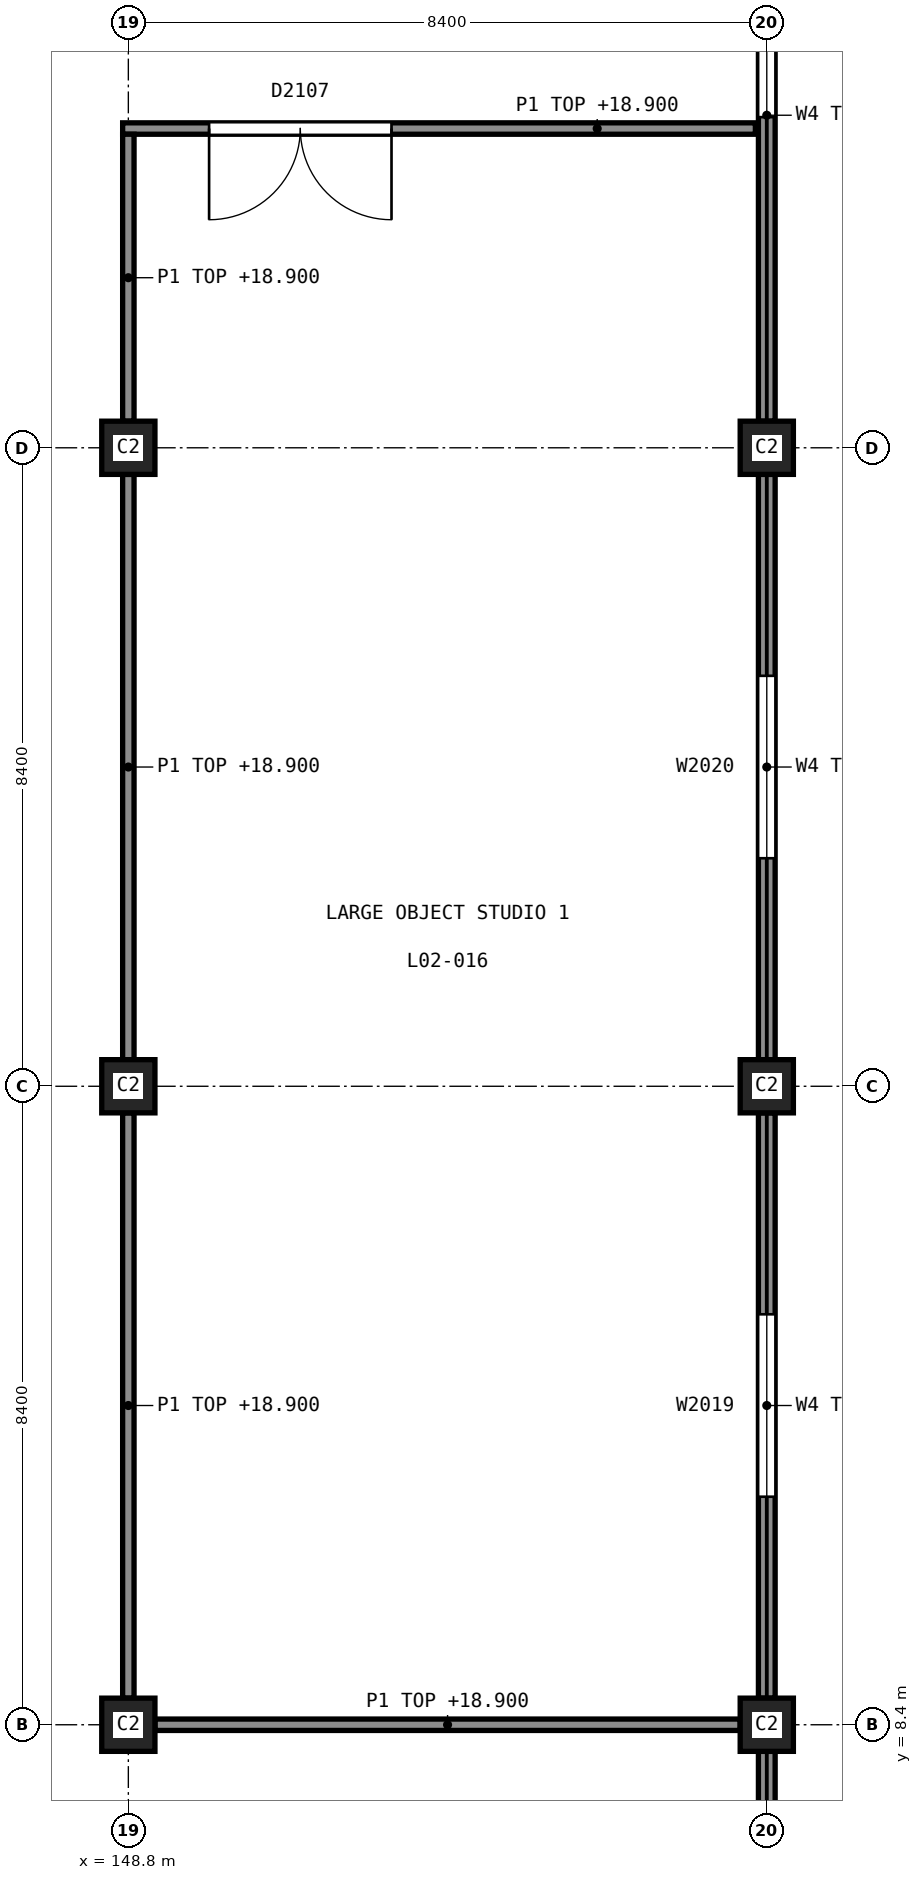
"""IFC4 building model, lengths in metres.
Left out: names, types, materials, properties, quantities, classifications, styles, units other than length and angle.
Written with IfcOpenShell. Run it as: python <this file> out.ifc"""

import sys

from ifc_helpers import new_model, si_unit, direction, frame, frame_2d, origin, origin_2d, place, context, subcontext, project, spatial, rectangle, extrude, element, fill, save


model = new_model("IFC4")
c1 = context("Model", 3, precision=1e-05, world=origin(), true_north=direction((0.0, 1.0)))
c2 = subcontext(c1, "Body", "Model", "MODEL_VIEW")
j1 = project(units=[si_unit("LENGTHUNIT", "METRE"), si_unit("PLANEANGLEUNIT", "RADIAN")], contexts=[c1])
p1 = place(None, origin())
s1 = spatial("IfcSite", under=j1, at=p1, CompositionType="ELEMENT")
p2 = place(p1, origin())
s2 = spatial("IfcBuilding", under=s1, at=p2, CompositionType="ELEMENT")
p3 = place(p2, frame((0.0, 0.0, 10.5)))
s3 = spatial("IfcBuildingStorey", under=s2, at=p3, CompositionType="ELEMENT", Elevation=10.5)
for number, where, z_axis, x_axis in (
    (1, (148.8, 8.4, 0.0), (0.0, 0.0, 1.0), (1.0, 0.0, 0.0)),
    (2, (148.8, 16.8, 0.0), (0.0, 0.0, 1.0), (1.0, 0.0, 0.0)),
    (3, (148.8, 25.2, 0.0), (0.0, 0.0, 1.0), (1.0, 0.0, 0.0)),
    (4, (157.2, 8.4, 0.0), (0.0, 0.0, 1.0), (1.0, 0.0, 0.0)),
    (5, (157.2, 16.8, 0.0), (0.0, 0.0, 1.0), (1.0, 0.0, 0.0)),
    (6, (157.2, 25.2, 0.0), (0.0, 0.0, 1.0), (1.0, 0.0, 0.0)),
):
    element("IfcColumn", number, at=place(p3, frame(where, z_axis=z_axis, x_axis=x_axis)), inside=s3, PredefinedType="COLUMN", context=c2, shape_type="SweptSolid", body=[
        extrude(rectangle(XDim=0.7, YDim=0.7, at=origin_2d()), origin(), (0.0, 0.0, 1.0), 9.5),
    ])
p4 = place(p3, frame((157.2, 0.35, 0.0), z_axis=(0.0, 0.0, 1.0), x_axis=(0.0, 1.0, 0.0)))
e7 = element("IfcWall", 7, at=p4, inside=s3, PredefinedType="SOLIDWALL", context=c2, shape_type="SweptSolid", body=[
    extrude(rectangle(XDim=7.7, YDim=0.22, at=frame_2d((3.85, 0.0))), origin(), (0.0, 0.0, 1.0), 8.44),
])
p5 = place(p4, frame((1.3, 0.0, 5.0)))
e8 = element("IfcOpeningElement", 8, at=p5, cuts=e7, PredefinedType="OPENING", context=c2, shape_type="SweptSolid", body=[
    extrude(rectangle(XDim=2.4, YDim=1.5, at=frame_2d((1.2, 0.75))), frame((0.0, 0.12, 0.0), z_axis=(0.0, -1.0, 0.0), x_axis=(1.0, 0.0, 0.0)), (0.0, 0.0, 1.0), 0.24),
])
p6 = place(p3, frame((157.2, 8.75, 0.0), z_axis=(0.0, 0.0, 1.0), x_axis=(0.0, 1.0, 0.0)))
e9 = element("IfcWall", 9, at=p6, inside=s3, PredefinedType="SOLIDWALL", context=c2, shape_type="SweptSolid", body=[
    extrude(rectangle(XDim=7.7, YDim=0.22, at=frame_2d((3.85, 0.0))), origin(), (0.0, 0.0, 1.0), 8.44),
])
p7 = place(p6, frame((2.65, 0.0, 5.0)))
e10 = element("IfcOpeningElement", 10, at=p7, cuts=e9, PredefinedType="OPENING", context=c2, shape_type="SweptSolid", body=[
    extrude(rectangle(XDim=2.4, YDim=1.5, at=frame_2d((1.2, 0.75))), frame((0.0, 0.12, 0.0), z_axis=(0.0, -1.0, 0.0), x_axis=(1.0, 0.0, 0.0)), (0.0, 0.0, 1.0), 0.24),
])
p8 = place(p3, frame((157.2, 17.15, 0.0), z_axis=(0.0, 0.0, 1.0), x_axis=(0.0, 1.0, 0.0)))
e11 = element("IfcWall", 11, at=p8, inside=s3, PredefinedType="SOLIDWALL", context=c2, shape_type="SweptSolid", body=[
    extrude(rectangle(XDim=7.7, YDim=0.22, at=frame_2d((3.85, 0.0))), origin(), (0.0, 0.0, 1.0), 8.44),
])
p9 = place(p8, frame((2.65, 0.0, 5.0)))
e12 = element("IfcOpeningElement", 12, at=p9, cuts=e11, PredefinedType="OPENING", context=c2, shape_type="SweptSolid", body=[
    extrude(rectangle(XDim=2.4, YDim=1.5, at=frame_2d((1.2, 0.75))), frame((0.0, 0.12, 0.0), z_axis=(0.0, -1.0, 0.0), x_axis=(1.0, 0.0, 0.0)), (0.0, 0.0, 1.0), 0.24),
])
p10 = place(p3, frame((157.2, 25.55, 0.0), z_axis=(0.0, 0.0, 1.0), x_axis=(0.0, 1.0, 0.0)))
e13 = element("IfcWall", 13, at=p10, inside=s3, PredefinedType="SOLIDWALL", context=c2, shape_type="SweptSolid", body=[
    extrude(rectangle(XDim=8.05, YDim=0.22, at=frame_2d((4.025, 0.0))), origin(), (0.0, 0.0, 1.0), 8.44),
])
p11 = place(p10, frame((4.0, 0.0, 5.0)))
e14 = element("IfcOpeningElement", 14, at=p11, cuts=e13, PredefinedType="OPENING", context=c2, shape_type="SweptSolid", body=[
    extrude(rectangle(XDim=2.4, YDim=1.5, at=frame_2d((1.2, 0.75))), frame((0.0, 0.12, 0.0), z_axis=(0.0, -1.0, 0.0), x_axis=(1.0, 0.0, 0.0)), (0.0, 0.0, 1.0), 0.24),
])
p12 = place(p3, frame((148.725, 29.4, 0.0), z_axis=(0.0, 0.0, 1.0), x_axis=(1.0, 0.0, 0.0)))
e15 = element("IfcWall", 15, at=p12, inside=s3, PredefinedType="PARTITIONING", context=c2, shape_type="SweptSolid", body=[
    extrude(rectangle(XDim=8.325, YDim=0.15, at=frame_2d((4.163, 0.0))), origin(), (0.0, 0.0, 1.0), 8.4),
])
p13 = place(p12, frame((1.137, 0.0, 0.0)))
e16 = element("IfcOpeningElement", 16, at=p13, cuts=e15, PredefinedType="OPENING", context=c2, shape_type="SweptSolid", body=[
    extrude(rectangle(XDim=2.4, YDim=2.4, at=frame_2d((1.2, 1.2))), frame((0.0, 0.085, 0.0), z_axis=(0.0, -1.0, 0.0), x_axis=(1.0, 0.0, 0.0)), (0.0, 0.0, 1.0), 0.17),
])
p14 = place(p3, frame((149.15, 8.4, 0.0), z_axis=(0.0, 0.0, 1.0), x_axis=(1.0, 0.0, 0.0)))
e17 = element("IfcWall", 17, at=p14, inside=s3, PredefinedType="PARTITIONING", context=c2, shape_type="SweptSolid", body=[
    extrude(rectangle(XDim=7.7, YDim=0.15, at=frame_2d((3.85, 0.0))), origin(), (0.0, 0.0, 1.0), 8.4),
])
p15 = place(p3, frame((148.8, 8.75, 0.0), z_axis=(0.0, 0.0, 1.0), x_axis=(0.0, 1.0, 0.0)))
e18 = element("IfcWall", 18, at=p15, inside=s3, PredefinedType="PARTITIONING", context=c2, shape_type="SweptSolid", body=[
    extrude(rectangle(XDim=7.7, YDim=0.15, at=frame_2d((3.85, 0.0))), origin(), (0.0, 0.0, 1.0), 8.4),
])
p16 = place(p3, frame((148.8, 17.15, 0.0), z_axis=(0.0, 0.0, 1.0), x_axis=(0.0, 1.0, 0.0)))
e19 = element("IfcWall", 19, at=p16, inside=s3, PredefinedType="PARTITIONING", context=c2, shape_type="SweptSolid", body=[
    extrude(rectangle(XDim=7.7, YDim=0.15, at=frame_2d((3.85, 0.0))), origin(), (0.0, 0.0, 1.0), 8.4),
])
p17 = place(p3, frame((148.8, 25.55, 0.0), z_axis=(0.0, 0.0, 1.0), x_axis=(0.0, 1.0, 0.0)))
e20 = element("IfcWall", 20, at=p17, inside=s3, PredefinedType="PARTITIONING", context=c2, shape_type="SweptSolid", body=[
    extrude(rectangle(XDim=3.775, YDim=0.15, at=frame_2d((1.887, 0.0))), origin(), (0.0, 0.0, 1.0), 8.4),
])
p18 = place(p7, origin())
e21 = element("IfcWindow", 21, at=p18, inside=s3, PartitioningType="SINGLE_PANEL", PredefinedType="WINDOW", context=c2, shape_type="SweptSolid", body=[
    extrude(rectangle(XDim=2.4, YDim=1.5, at=frame_2d((1.2, 0.75))), frame((0.0, 0.09, 0.0), z_axis=(0.0, -1.0, 0.0), x_axis=(1.0, 0.0, 0.0)), (0.0, 0.0, 1.0), 0.06),
])
fill(e10, e21)
p19 = place(p9, origin())
e22 = element("IfcWindow", 22, at=p19, inside=s3, PartitioningType="SINGLE_PANEL", PredefinedType="WINDOW", context=c2, shape_type="SweptSolid", body=[
    extrude(rectangle(XDim=2.4, YDim=1.5, at=frame_2d((1.2, 0.75))), frame((0.0, 0.09, 0.0), z_axis=(0.0, -1.0, 0.0), x_axis=(1.0, 0.0, 0.0)), (0.0, 0.0, 1.0), 0.06),
])
fill(e12, e22)
p20 = place(p11, origin())
e23 = element("IfcWindow", 23, at=p20, inside=s3, PartitioningType="SINGLE_PANEL", PredefinedType="WINDOW", context=c2, shape_type="SweptSolid", body=[
    extrude(rectangle(XDim=2.4, YDim=1.5, at=frame_2d((1.2, 0.75))), frame((0.0, 0.09, 0.0), z_axis=(0.0, -1.0, 0.0), x_axis=(1.0, 0.0, 0.0)), (0.0, 0.0, 1.0), 0.06),
])
fill(e14, e23)
p21 = place(p13, origin())
e24 = element("IfcDoor", 24, at=p21, inside=s3, OperationType="DOUBLE_DOOR_SINGLE_SWING", PredefinedType="DOOR", context=c2, shape_type="SweptSolid", body=[
    extrude(rectangle(XDim=2.4, YDim=2.4, at=frame_2d((1.2, 1.2))), frame((0.0, 0.025, 0.0), z_axis=(0.0, -1.0, 0.0), x_axis=(1.0, 0.0, 0.0)), (0.0, 0.0, 1.0), 0.05),
])
fill(e16, e24)
save(model, sys.argv[1])
